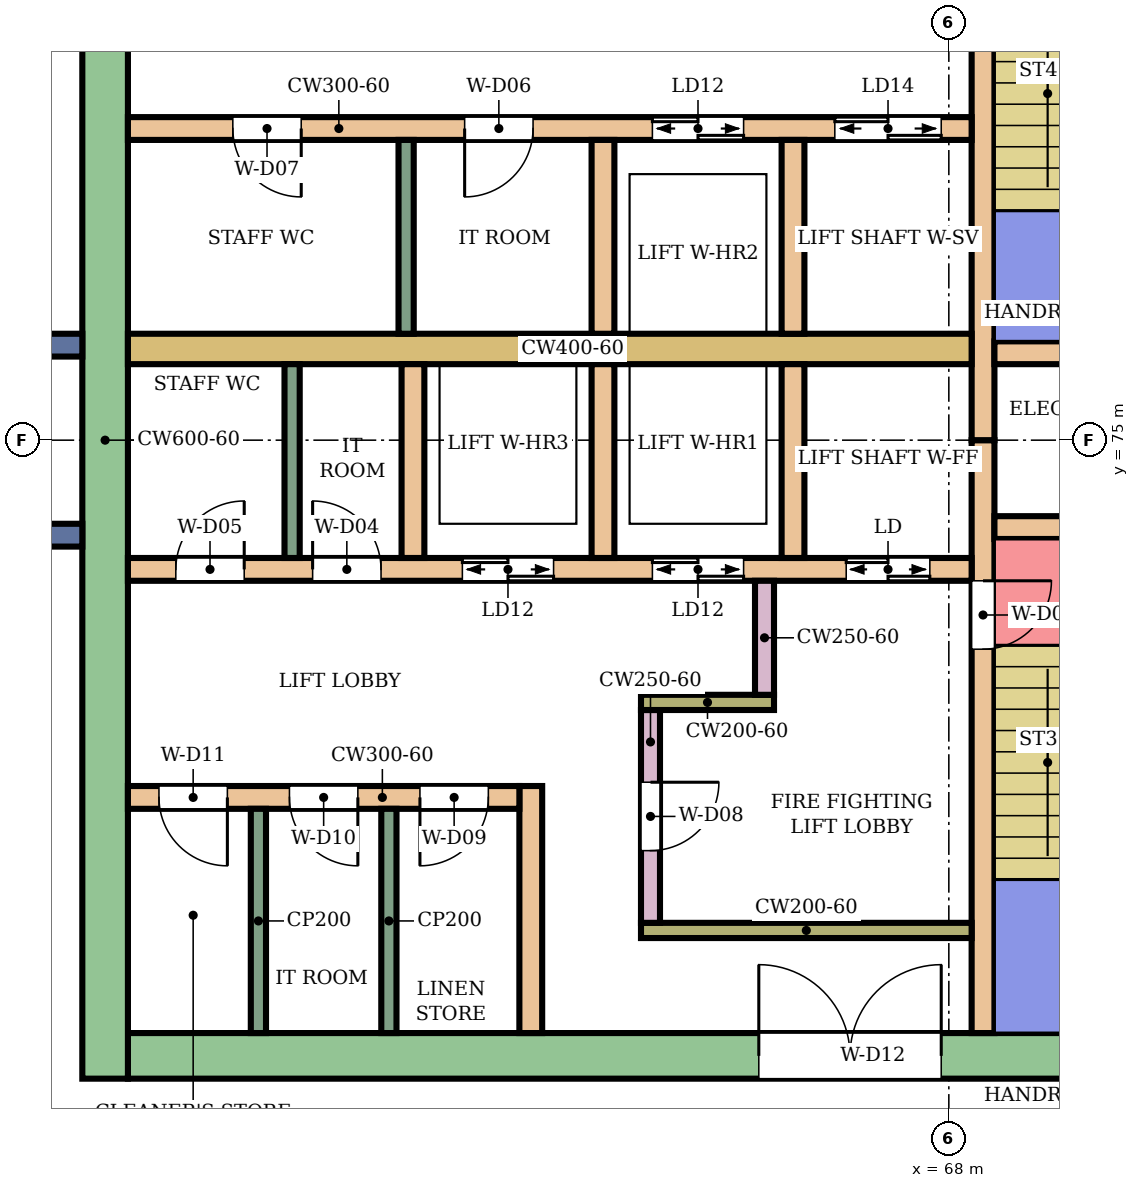
"""IFC4 building model, lengths in metres.
Left out: names, types, materials, properties, quantities, classifications, styles, units other than length and angle.
Written with IfcOpenShell. Run it as: python <this file> out.ifc"""

import sys

from ifc_helpers import new_model, si_unit, direction, frame, frame_2d, origin, place, context, subcontext, project, spatial, rectangle, extrude, element, fill, save


model = new_model("IFC4")
c1 = context("Model", 3, precision=1e-05, world=origin(), true_north=direction((0.0, 1.0)))
c2 = subcontext(c1, "Body", "Model", "MODEL_VIEW")
j1 = project(units=[si_unit("LENGTHUNIT", "METRE"), si_unit("PLANEANGLEUNIT", "RADIAN")], contexts=[c1])
p1 = place(None, origin())
s1 = spatial("IfcSite", under=j1, at=p1, CompositionType="ELEMENT")
p2 = place(p1, origin())
s2 = spatial("IfcBuilding", under=s1, at=p2, CompositionType="ELEMENT")
p3 = place(p2, frame((0.0, 0.0, 258.3)))
s3 = spatial("IfcBuildingStorey", under=s2, at=p3, CompositionType="ELEMENT", Elevation=258.3)
p4 = place(p3, frame((72.1, 66.9, 0.0), z_axis=(0.0, 0.0, 1.0), x_axis=(-1.0, 0.0, 0.0)))
e1 = element("IfcWall", 1, at=p4, inside=s3, PredefinedType="SHEAR", context=c2, shape_type="SweptSolid", body=[
    extrude(rectangle(XDim=14.9, YDim=0.6, at=frame_2d((7.45, 0.0))), origin(), (0.0, 0.0, 1.0), 3.88),
])
p5 = place(p4, frame((4.2, 0.0, 0.0)))
e2 = element("IfcOpeningElement", 2, at=p5, cuts=e1, PredefinedType="OPENING", context=c2, shape_type="SweptSolid", body=[
    extrude(rectangle(XDim=2.4, YDim=2.4, at=frame_2d((1.2, 1.2))), frame((0.0, 0.31, 0.0), z_axis=(0.0, -1.0, 0.0), x_axis=(1.0, 0.0, 0.0)), (0.0, 0.0, 1.0), 0.62),
])
p6 = place(p3, frame((56.9, 83.4, 0.0), z_axis=(0.0, 0.0, 1.0), x_axis=(0.0, -1.0, 0.0)))
e3 = element("IfcWall", 3, at=p6, inside=s3, PredefinedType="SHEAR", context=c2, shape_type="SweptSolid", body=[
    extrude(rectangle(XDim=16.8, YDim=0.6, at=frame_2d((8.4, 0.0))), origin(), (0.0, 0.0, 1.0), 3.88),
])
p7 = place(p3, frame((68.45, 75.0, 0.0), z_axis=(0.0, 0.0, 1.0), x_axis=(0.0, -1.0, 0.0)))
e4 = element("IfcWall", 4, at=p7, inside=s3, PredefinedType="SHEAR", context=c2, shape_type="SweptSolid", body=[
    extrude(rectangle(XDim=7.8, YDim=0.3, at=frame_2d((3.9, 0.0))), origin(), (0.0, 0.0, 1.0), 3.88),
])
p8 = place(p7, frame((1.85, 0.0, 0.0)))
e5 = element("IfcOpeningElement", 5, at=p8, cuts=e4, PredefinedType="OPENING", context=c2, shape_type="SweptSolid", body=[
    extrude(rectangle(XDim=0.9, YDim=2.1, at=frame_2d((0.45, 1.05))), frame((0.0, 0.16, 0.0), z_axis=(0.0, -1.0, 0.0), x_axis=(1.0, 0.0, 0.0)), (0.0, 0.0, 1.0), 0.32),
])
p9 = place(p3, frame((68.45, 82.8, 0.0), z_axis=(0.0, 0.0, 1.0), x_axis=(0.0, -1.0, 0.0)))
e6 = element("IfcWall", 6, at=p9, inside=s3, PredefinedType="SHEAR", context=c2, shape_type="SweptSolid", body=[
    extrude(rectangle(XDim=7.8, YDim=0.3, at=frame_2d((3.9, 0.0))), origin(), (0.0, 0.0, 1.0), 3.88),
])
p10 = place(p9, frame((0.45, 0.0, 0.0)))
e7 = element("IfcOpeningElement", 7, at=p10, cuts=e6, PredefinedType="OPENING", context=c2, shape_type="SweptSolid", body=[
    extrude(rectangle(XDim=0.9, YDim=2.1, at=frame_2d((0.45, 1.05))), frame((0.0, 0.16, 0.0), z_axis=(0.0, -1.0, 0.0), x_axis=(1.0, 0.0, 0.0)), (0.0, 0.0, 1.0), 0.32),
])
p11 = place(p3, frame((71.65, 73.85, 0.0), z_axis=(0.0, 0.0, 1.0), x_axis=(-1.0, 0.0, 0.0)))
e8 = element("IfcWall", 8, at=p11, inside=s3, PredefinedType="SHEAR", context=c2, shape_type="SweptSolid", body=[
    extrude(rectangle(XDim=3.05, YDim=0.3, at=frame_2d((1.525, 0.0))), origin(), (0.0, 0.0, 1.0), 3.88),
])
p12 = place(p11, frame((1.1, 0.0, 0.0)))
e9 = element("IfcOpeningElement", 9, at=p12, cuts=e8, PredefinedType="OPENING", context=c2, shape_type="SweptSolid", body=[
    extrude(rectangle(XDim=0.7, YDim=2.0, at=frame_2d((0.35, 1.0))), frame((0.0, 0.16, 0.0), z_axis=(0.0, -1.0, 0.0), x_axis=(1.0, 0.0, 0.0)), (0.0, 0.0, 1.0), 0.32),
])
p13 = place(p3, frame((71.65, 76.15, 0.0), z_axis=(0.0, 0.0, 1.0), x_axis=(-1.0, 0.0, 0.0)))
e10 = element("IfcWall", 10, at=p13, inside=s3, PredefinedType="SHEAR", context=c2, shape_type="SweptSolid", body=[
    extrude(rectangle(XDim=3.05, YDim=0.3, at=frame_2d((1.525, 0.0))), origin(), (0.0, 0.0, 1.0), 3.88),
])
p14 = place(p3, frame((68.3, 73.3, 0.0), z_axis=(0.0, 0.0, 1.0), x_axis=(-1.0, 0.0, 0.0)))
e11 = element("IfcWall", 11, at=p14, inside=s3, PredefinedType="SHEAR", context=c2, shape_type="SweptSolid", body=[
    extrude(rectangle(XDim=11.1, YDim=0.3, at=frame_2d((5.55, 0.0))), origin(), (0.0, 0.0, 1.0), 3.88),
])
p15 = place(p14, frame((0.55, 0.0, 0.0)))
e12 = element("IfcOpeningElement", 12, at=p15, cuts=e11, PredefinedType="OPENING", context=c2, shape_type="SweptSolid", body=[
    extrude(rectangle(XDim=1.1, YDim=2.1, at=frame_2d((0.55, 1.05))), frame((0.0, 0.16, 0.0), z_axis=(0.0, -1.0, 0.0), x_axis=(1.0, 0.0, 0.0)), (0.0, 0.0, 1.0), 0.32),
])
p16 = place(p14, frame((3.0, 0.0, 0.0)))
e13 = element("IfcOpeningElement", 13, at=p16, cuts=e11, PredefinedType="OPENING", context=c2, shape_type="SweptSolid", body=[
    extrude(rectangle(XDim=1.2, YDim=2.1, at=frame_2d((0.6, 1.05))), frame((0.0, 0.16, 0.0), z_axis=(0.0, -1.0, 0.0), x_axis=(1.0, 0.0, 0.0)), (0.0, 0.0, 1.0), 0.32),
])
p17 = place(p14, frame((5.5, 0.0, 0.0)))
e14 = element("IfcOpeningElement", 14, at=p17, cuts=e11, PredefinedType="OPENING", context=c2, shape_type="SweptSolid", body=[
    extrude(rectangle(XDim=1.2, YDim=2.1, at=frame_2d((0.6, 1.05))), frame((0.0, 0.16, 0.0), z_axis=(0.0, -1.0, 0.0), x_axis=(1.0, 0.0, 0.0)), (0.0, 0.0, 1.0), 0.32),
])
p18 = place(p14, frame((7.77, 0.0, 0.0)))
e15 = element("IfcOpeningElement", 15, at=p18, cuts=e11, PredefinedType="OPENING", context=c2, shape_type="SweptSolid", body=[
    extrude(rectangle(XDim=0.9, YDim=2.1, at=frame_2d((0.45, 1.05))), frame((0.0, 0.16, 0.0), z_axis=(0.0, -1.0, 0.0), x_axis=(1.0, 0.0, 0.0)), (0.0, 0.0, 1.0), 0.32),
])
p19 = place(p14, frame((9.57, 0.0, 0.0)))
e16 = element("IfcOpeningElement", 16, at=p19, cuts=e11, PredefinedType="OPENING", context=c2, shape_type="SweptSolid", body=[
    extrude(rectangle(XDim=0.9, YDim=2.1, at=frame_2d((0.45, 1.05))), frame((0.0, 0.16, 0.0), z_axis=(0.0, -1.0, 0.0), x_axis=(1.0, 0.0, 0.0)), (0.0, 0.0, 1.0), 0.32),
])
p20 = place(p3, frame((68.3, 76.2, 0.0), z_axis=(0.0, 0.0, 1.0), x_axis=(-1.0, 0.0, 0.0)))
e17 = element("IfcWall", 17, at=p20, inside=s3, PredefinedType="SHEAR", context=c2, shape_type="SweptSolid", body=[
    extrude(rectangle(XDim=11.1, YDim=0.4, at=frame_2d((5.55, 0.0))), origin(), (0.0, 0.0, 1.0), 3.88),
])
p21 = place(p3, frame((68.3, 79.1, 0.0), z_axis=(0.0, 0.0, 1.0), x_axis=(-1.0, 0.0, 0.0)))
e18 = element("IfcWall", 18, at=p21, inside=s3, PredefinedType="SHEAR", context=c2, shape_type="SweptSolid", body=[
    extrude(rectangle(XDim=11.1, YDim=0.3, at=frame_2d((5.55, 0.0))), origin(), (0.0, 0.0, 1.0), 3.88),
])
p22 = place(p21, frame((0.4, 0.0, 0.0)))
e19 = element("IfcOpeningElement", 19, at=p22, cuts=e18, PredefinedType="OPENING", context=c2, shape_type="SweptSolid", body=[
    extrude(rectangle(XDim=1.4, YDim=2.1, at=frame_2d((0.7, 1.05))), frame((0.0, 0.16, 0.0), z_axis=(0.0, -1.0, 0.0), x_axis=(1.0, 0.0, 0.0)), (0.0, 0.0, 1.0), 0.32),
])
p23 = place(p21, frame((3.0, 0.0, 0.0)))
e20 = element("IfcOpeningElement", 20, at=p23, cuts=e18, PredefinedType="OPENING", context=c2, shape_type="SweptSolid", body=[
    extrude(rectangle(XDim=1.2, YDim=2.1, at=frame_2d((0.6, 1.05))), frame((0.0, 0.16, 0.0), z_axis=(0.0, -1.0, 0.0), x_axis=(1.0, 0.0, 0.0)), (0.0, 0.0, 1.0), 0.32),
])
p24 = place(p21, frame((5.77, 0.0, 0.0)))
e21 = element("IfcOpeningElement", 21, at=p24, cuts=e18, PredefinedType="OPENING", context=c2, shape_type="SweptSolid", body=[
    extrude(rectangle(XDim=0.9, YDim=2.1, at=frame_2d((0.45, 1.05))), frame((0.0, 0.16, 0.0), z_axis=(0.0, -1.0, 0.0), x_axis=(1.0, 0.0, 0.0)), (0.0, 0.0, 1.0), 0.32),
])
p25 = place(p21, frame((8.82, 0.0, 0.0)))
e22 = element("IfcOpeningElement", 22, at=p25, cuts=e18, PredefinedType="OPENING", context=c2, shape_type="SweptSolid", body=[
    extrude(rectangle(XDim=0.9, YDim=2.1, at=frame_2d((0.45, 1.05))), frame((0.0, 0.16, 0.0), z_axis=(0.0, -1.0, 0.0), x_axis=(1.0, 0.0, 0.0)), (0.0, 0.0, 1.0), 0.32),
])
for number, where, z_axis, x_axis in (
    (23, (65.95, 76.0, 0.0), (0.0, 0.0, 1.0), (0.0, -1.0, 0.0)),
    (24, (63.45, 76.0, 0.0), (0.0, 0.0, 1.0), (0.0, -1.0, 0.0)),
    (25, (60.95, 76.0, 0.0), (0.0, 0.0, 1.0), (0.0, -1.0, 0.0)),
    (26, (65.95, 78.95, 0.0), (0.0, 0.0, 1.0), (0.0, -1.0, 0.0)),
    (27, (63.45, 78.95, 0.0), (0.0, 0.0, 1.0), (0.0, -1.0, 0.0)),
):
    element("IfcWall", number, at=place(p3, frame(where, z_axis=z_axis, x_axis=x_axis)), inside=s3, PredefinedType="SHEAR", context=c2, shape_type="SweptSolid", body=[
        extrude(rectangle(XDim=2.55, YDim=0.3, at=frame_2d((1.275, 0.0))), origin(), (0.0, 0.0, 1.0), 3.88),
    ])
p26 = place(p3, frame((68.3, 68.55, 0.0), z_axis=(0.0, 0.0, 1.0), x_axis=(-1.0, 0.0, 0.0)))
e28 = element("IfcWall", 28, at=p26, inside=s3, PredefinedType="SHEAR", context=c2, shape_type="SweptSolid", body=[
    extrude(rectangle(XDim=4.35, YDim=0.2, at=frame_2d((2.175, 0.0))), origin(), (0.0, 0.0, 1.0), 3.88),
])
p27 = place(p3, frame((64.075, 71.45, 0.0), z_axis=(0.0, 0.0, 1.0), x_axis=(0.0, -1.0, 0.0)))
e29 = element("IfcWall", 29, at=p27, inside=s3, PredefinedType="SHEAR", context=c2, shape_type="SweptSolid", body=[
    extrude(rectangle(XDim=2.8, YDim=0.25, at=frame_2d((1.4, 0.0))), origin(), (0.0, 0.0, 1.0), 3.88),
])
p28 = place(p27, frame((0.95, 0.0, 0.0)))
e30 = element("IfcOpeningElement", 30, at=p28, cuts=e29, PredefinedType="OPENING", context=c2, shape_type="SweptSolid", body=[
    extrude(rectangle(XDim=0.9, YDim=2.1, at=frame_2d((0.45, 1.05))), frame((0.0, 0.135, 0.0), z_axis=(0.0, -1.0, 0.0), x_axis=(1.0, 0.0, 0.0)), (0.0, 0.0, 1.0), 0.27),
])
p29 = place(p3, frame((65.7, 71.55, 0.0), z_axis=(0.0, 0.0, 1.0), x_axis=(-1.0, 0.0, 0.0)))
e31 = element("IfcWall", 31, at=p29, inside=s3, PredefinedType="SHEAR", context=c2, shape_type="SweptSolid", body=[
    extrude(rectangle(XDim=1.75, YDim=0.2, at=frame_2d((0.875, 0.0))), origin(), (0.0, 0.0, 1.0), 3.88),
])
p30 = place(p3, frame((65.575, 73.15, 0.0), z_axis=(0.0, 0.0, 1.0), x_axis=(0.0, -1.0, 0.0)))
e32 = element("IfcWall", 32, at=p30, inside=s3, PredefinedType="SHEAR", context=c2, shape_type="SweptSolid", body=[
    extrude(rectangle(XDim=1.5, YDim=0.25, at=frame_2d((0.75, 0.0))), origin(), (0.0, 0.0, 1.0), 3.88),
])
p31 = place(p3, frame((62.5, 70.45, 0.0), z_axis=(0.0, 0.0, 1.0), x_axis=(0.0, -1.0, 0.0)))
e33 = element("IfcWall", 33, at=p31, inside=s3, PredefinedType="SHEAR", context=c2, shape_type="SweptSolid", body=[
    extrude(rectangle(XDim=3.25, YDim=0.3, at=frame_2d((1.625, 0.0))), origin(), (0.0, 0.0, 1.0), 3.88),
])
p32 = place(p3, frame((62.35, 70.3, 0.0), z_axis=(0.0, 0.0, 1.0), x_axis=(-1.0, 0.0, 0.0)))
e34 = element("IfcWall", 34, at=p32, inside=s3, PredefinedType="SHEAR", context=c2, shape_type="SweptSolid", body=[
    extrude(rectangle(XDim=5.15, YDim=0.3, at=frame_2d((2.575, 0.0))), origin(), (0.0, 0.0, 1.0), 3.88),
])
p33 = place(p32, frame((0.408, 0.0, 0.0)))
e35 = element("IfcOpeningElement", 35, at=p33, cuts=e34, PredefinedType="OPENING", context=c2, shape_type="SweptSolid", body=[
    extrude(rectangle(XDim=0.9, YDim=2.1, at=frame_2d((0.45, 1.05))), frame((0.0, 0.16, 0.0), z_axis=(0.0, -1.0, 0.0), x_axis=(1.0, 0.0, 0.0)), (0.0, 0.0, 1.0), 0.32),
])
p34 = place(p32, frame((2.125, 0.0, 0.0)))
e36 = element("IfcOpeningElement", 36, at=p34, cuts=e34, PredefinedType="OPENING", context=c2, shape_type="SweptSolid", body=[
    extrude(rectangle(XDim=0.9, YDim=2.1, at=frame_2d((0.45, 1.05))), frame((0.0, 0.16, 0.0), z_axis=(0.0, -1.0, 0.0), x_axis=(1.0, 0.0, 0.0)), (0.0, 0.0, 1.0), 0.32),
])
p35 = place(p32, frame((3.842, 0.0, 0.0)))
e37 = element("IfcOpeningElement", 37, at=p35, cuts=e34, PredefinedType="OPENING", context=c2, shape_type="SweptSolid", body=[
    extrude(rectangle(XDim=0.9, YDim=2.1, at=frame_2d((0.45, 1.05))), frame((0.0, 0.16, 0.0), z_axis=(0.0, -1.0, 0.0), x_axis=(1.0, 0.0, 0.0)), (0.0, 0.0, 1.0), 0.32),
])
for number, where, z_axis, x_axis in (
    (38, (56.6, 76.25, 0.0), (0.0, 0.0, 1.0), (-1.0, 0.0, 0.0)),
    (39, (56.6, 73.75, 0.0), (0.0, 0.0, 1.0), (-1.0, 0.0, 0.0)),
):
    element("IfcWall", number, at=place(p3, frame(where, z_axis=z_axis, x_axis=x_axis)), inside=s3, PredefinedType="NOTDEFINED", context=c2, shape_type="SweptSolid", body=[
        extrude(rectangle(XDim=2.416, YDim=0.3, at=frame_2d((1.208, 0.0))), origin(), (0.0, 0.0, 1.0), 4.2),
    ])
for number, where, z_axis, x_axis in (
    (40, (59.36, 76.0, 0.0), (0.0, 0.0, 1.0), (0.0, -1.0, 0.0)),
    (41, (60.86, 78.95, 0.0), (0.0, 0.0, 1.0), (0.0, -1.0, 0.0)),
):
    element("IfcWall", number, at=place(p3, frame(where, z_axis=z_axis, x_axis=x_axis)), inside=s3, PredefinedType="PARTITIONING", context=c2, shape_type="SweptSolid", body=[
        extrude(rectangle(XDim=2.55, YDim=0.2, at=frame_2d((1.275, 0.0))), origin(), (0.0, 0.0, 1.0), 3.88),
    ])
for number, where, z_axis, x_axis in (
    (42, (60.633, 70.15, 0.0), (0.0, 0.0, 1.0), (0.0, -1.0, 0.0)),
    (43, (58.917, 70.15, 0.0), (0.0, 0.0, 1.0), (0.0, -1.0, 0.0)),
):
    element("IfcWall", number, at=place(p3, frame(where, z_axis=z_axis, x_axis=x_axis)), inside=s3, PredefinedType="PARTITIONING", context=c2, shape_type="SweptSolid", body=[
        extrude(rectangle(XDim=2.95, YDim=0.2, at=frame_2d((1.475, 0.0))), origin(), (0.0, 0.0, 1.0), 3.88),
    ])
p36 = place(p8, origin())
e44 = element("IfcDoor", 44, at=p36, inside=s3, OperationType="SINGLE_SWING_LEFT", PredefinedType="DOOR", context=c2, shape_type="SweptSolid", body=[
    extrude(rectangle(XDim=0.9, YDim=2.1, at=frame_2d((0.45, 1.05))), frame((0.0, 0.025, 0.0), z_axis=(0.0, -1.0, 0.0), x_axis=(1.0, 0.0, 0.0)), (0.0, 0.0, 1.0), 0.05),
])
fill(e5, e44)
p37 = place(p15, origin())
e45 = element("IfcDoor", 45, at=p37, inside=s3, OperationType="DOUBLE_DOOR_SLIDING", PredefinedType="DOOR", context=c2, shape_type="SweptSolid", body=[
    extrude(rectangle(XDim=1.1, YDim=2.1, at=frame_2d((0.55, 1.05))), frame((0.0, 0.025, 0.0), z_axis=(0.0, -1.0, 0.0), x_axis=(1.0, 0.0, 0.0)), (0.0, 0.0, 1.0), 0.05),
])
fill(e12, e45)
p38 = place(p16, origin())
e46 = element("IfcDoor", 46, at=p38, inside=s3, OperationType="DOUBLE_DOOR_SLIDING", PredefinedType="DOOR", context=c2, shape_type="SweptSolid", body=[
    extrude(rectangle(XDim=1.2, YDim=2.1, at=frame_2d((0.6, 1.05))), frame((0.0, 0.025, 0.0), z_axis=(0.0, -1.0, 0.0), x_axis=(1.0, 0.0, 0.0)), (0.0, 0.0, 1.0), 0.05),
])
fill(e13, e46)
p39 = place(p17, origin())
e47 = element("IfcDoor", 47, at=p39, inside=s3, OperationType="DOUBLE_DOOR_SLIDING", PredefinedType="DOOR", context=c2, shape_type="SweptSolid", body=[
    extrude(rectangle(XDim=1.2, YDim=2.1, at=frame_2d((0.6, 1.05))), frame((0.0, 0.025, 0.0), z_axis=(0.0, -1.0, 0.0), x_axis=(1.0, 0.0, 0.0)), (0.0, 0.0, 1.0), 0.05),
])
fill(e14, e47)
p40 = place(p18, frame((0.9, 0.0, 0.0), z_axis=(0.0, 0.0, 1.0), x_axis=(-1.0, 0.0, 0.0)))
e48 = element("IfcDoor", 48, at=p40, inside=s3, OperationType="SINGLE_SWING_LEFT", PredefinedType="DOOR", context=c2, shape_type="SweptSolid", body=[
    extrude(rectangle(XDim=0.9, YDim=2.1, at=frame_2d((0.45, 1.05))), frame((0.0, 0.025, 0.0), z_axis=(0.0, -1.0, 0.0), x_axis=(1.0, 0.0, 0.0)), (0.0, 0.0, 1.0), 0.05),
])
fill(e15, e48)
p41 = place(p19, frame((0.9, 0.0, 0.0), z_axis=(0.0, 0.0, 1.0), x_axis=(-1.0, 0.0, 0.0)))
e49 = element("IfcDoor", 49, at=p41, inside=s3, OperationType="SINGLE_SWING_RIGHT", PredefinedType="DOOR", context=c2, shape_type="SweptSolid", body=[
    extrude(rectangle(XDim=0.9, YDim=2.1, at=frame_2d((0.45, 1.05))), frame((0.0, 0.025, 0.0), z_axis=(0.0, -1.0, 0.0), x_axis=(1.0, 0.0, 0.0)), (0.0, 0.0, 1.0), 0.05),
])
fill(e16, e49)
p42 = place(p22, origin())
e50 = element("IfcDoor", 50, at=p42, inside=s3, OperationType="DOUBLE_DOOR_SLIDING", PredefinedType="DOOR", context=c2, shape_type="SweptSolid", body=[
    extrude(rectangle(XDim=1.4, YDim=2.1, at=frame_2d((0.7, 1.05))), frame((0.0, 0.025, 0.0), z_axis=(0.0, -1.0, 0.0), x_axis=(1.0, 0.0, 0.0)), (0.0, 0.0, 1.0), 0.05),
])
fill(e19, e50)
p43 = place(p23, origin())
e51 = element("IfcDoor", 51, at=p43, inside=s3, OperationType="DOUBLE_DOOR_SLIDING", PredefinedType="DOOR", context=c2, shape_type="SweptSolid", body=[
    extrude(rectangle(XDim=1.2, YDim=2.1, at=frame_2d((0.6, 1.05))), frame((0.0, 0.025, 0.0), z_axis=(0.0, -1.0, 0.0), x_axis=(1.0, 0.0, 0.0)), (0.0, 0.0, 1.0), 0.05),
])
fill(e20, e51)
p44 = place(p24, origin())
e52 = element("IfcDoor", 52, at=p44, inside=s3, OperationType="SINGLE_SWING_RIGHT", PredefinedType="DOOR", context=c2, shape_type="SweptSolid", body=[
    extrude(rectangle(XDim=0.9, YDim=2.1, at=frame_2d((0.45, 1.05))), frame((0.0, 0.025, 0.0), z_axis=(0.0, -1.0, 0.0), x_axis=(1.0, 0.0, 0.0)), (0.0, 0.0, 1.0), 0.05),
])
fill(e21, e52)
p45 = place(p25, origin())
e53 = element("IfcDoor", 53, at=p45, inside=s3, OperationType="SINGLE_SWING_LEFT", PredefinedType="DOOR", context=c2, shape_type="SweptSolid", body=[
    extrude(rectangle(XDim=0.9, YDim=2.1, at=frame_2d((0.45, 1.05))), frame((0.0, 0.025, 0.0), z_axis=(0.0, -1.0, 0.0), x_axis=(1.0, 0.0, 0.0)), (0.0, 0.0, 1.0), 0.05),
])
fill(e22, e53)
p46 = place(p28, origin())
e54 = element("IfcDoor", 54, at=p46, inside=s3, OperationType="SINGLE_SWING_LEFT", PredefinedType="DOOR", context=c2, shape_type="SweptSolid", body=[
    extrude(rectangle(XDim=0.9, YDim=2.1, at=frame_2d((0.45, 1.05))), frame((0.0, 0.025, 0.0), z_axis=(0.0, -1.0, 0.0), x_axis=(1.0, 0.0, 0.0)), (0.0, 0.0, 1.0), 0.05),
])
fill(e30, e54)
p47 = place(p33, origin())
e55 = element("IfcDoor", 55, at=p47, inside=s3, OperationType="SINGLE_SWING_RIGHT", PredefinedType="DOOR", context=c2, shape_type="SweptSolid", body=[
    extrude(rectangle(XDim=0.9, YDim=2.1, at=frame_2d((0.45, 1.05))), frame((0.0, 0.025, 0.0), z_axis=(0.0, -1.0, 0.0), x_axis=(1.0, 0.0, 0.0)), (0.0, 0.0, 1.0), 0.05),
])
fill(e35, e55)
p48 = place(p34, origin())
e56 = element("IfcDoor", 56, at=p48, inside=s3, OperationType="SINGLE_SWING_LEFT", PredefinedType="DOOR", context=c2, shape_type="SweptSolid", body=[
    extrude(rectangle(XDim=0.9, YDim=2.1, at=frame_2d((0.45, 1.05))), frame((0.0, 0.025, 0.0), z_axis=(0.0, -1.0, 0.0), x_axis=(1.0, 0.0, 0.0)), (0.0, 0.0, 1.0), 0.05),
])
fill(e36, e56)
p49 = place(p35, origin())
e57 = element("IfcDoor", 57, at=p49, inside=s3, OperationType="SINGLE_SWING_LEFT", PredefinedType="DOOR", context=c2, shape_type="SweptSolid", body=[
    extrude(rectangle(XDim=0.9, YDim=2.1, at=frame_2d((0.45, 1.05))), frame((0.0, 0.025, 0.0), z_axis=(0.0, -1.0, 0.0), x_axis=(1.0, 0.0, 0.0)), (0.0, 0.0, 1.0), 0.05),
])
fill(e37, e57)
p50 = place(p5, frame((2.4, 0.0, 0.0), z_axis=(0.0, 0.0, 1.0), x_axis=(-1.0, 0.0, 0.0)))
e58 = element("IfcDoor", 58, at=p50, inside=s3, OperationType="DOUBLE_DOOR_SINGLE_SWING", PredefinedType="DOOR", context=c2, shape_type="SweptSolid", body=[
    extrude(rectangle(XDim=2.4, YDim=2.4, at=frame_2d((1.2, 1.2))), frame((0.0, 0.025, 0.0), z_axis=(0.0, -1.0, 0.0), x_axis=(1.0, 0.0, 0.0)), (0.0, 0.0, 1.0), 0.05),
])
fill(e2, e58)
save(model, sys.argv[1])
